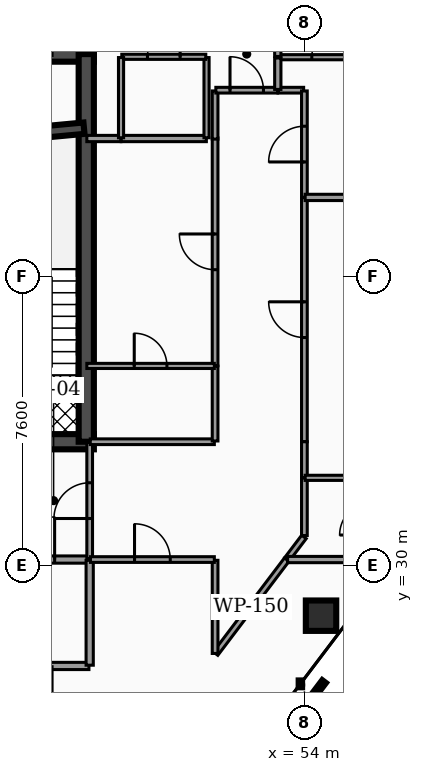
"""IFC4 building model, lengths in metres.
Left out: names, types, materials, properties, quantities, classifications, styles, units other than length and angle.
Written with IfcOpenShell. Run it as: python <this file> out.ifc"""

import sys

from ifc_helpers import new_model, si_unit, direction, frame, frame_2d, origin, origin_2d, place, context, subcontext, project, spatial, rectangle, hollow_rectangle, extrude, element, fill, save


model = new_model("IFC4")
c1 = context("Model", 3, precision=1e-05, world=origin(), true_north=direction((0.0, 1.0)))
c2 = subcontext(c1, "Body", "Model", "MODEL_VIEW")
j1 = project(units=[si_unit("LENGTHUNIT", "METRE"), si_unit("PLANEANGLEUNIT", "RADIAN")], contexts=[c1])
p1 = place(None, origin())
s1 = spatial("IfcSite", under=j1, at=p1, CompositionType="ELEMENT")
p2 = place(p1, origin())
s2 = spatial("IfcBuilding", under=s1, at=p2, CompositionType="ELEMENT")
p3 = place(p2, frame((0.0, 0.0, 130.9)))
s3 = spatial("IfcBuildingStorey", under=s2, at=p3, CompositionType="ELEMENT", Elevation=130.9)
p4 = place(p3, frame((28.4, 43.45, 0.0), z_axis=(0.0, 0.0, 1.0), x_axis=(1.0, 0.0, 0.0)))
e1 = element("IfcWall", 1, at=p4, inside=s3, PredefinedType="SHEAR", context=c2, shape_type="SweptSolid", body=[
    extrude(rectangle(XDim=20.06, YDim=0.4, at=frame_2d((10.03, 0.0))), origin(), (0.0, 0.0, 1.0), 3.5),
])
p5 = place(p3, frame((28.4, 33.25, 0.0), z_axis=(0.0, 0.0, 1.0), x_axis=(1.0, 0.0, 0.0)))
e2 = element("IfcWall", 2, at=p5, inside=s3, PredefinedType="SHEAR", context=c2, shape_type="SweptSolid", body=[
    extrude(rectangle(XDim=20.06, YDim=0.4, at=frame_2d((10.03, 0.0))), origin(), (0.0, 0.0, 1.0), 3.5),
])
p6 = place(p5, frame((4.03, 0.0, 0.0)))
e3 = element("IfcOpeningElement", 3, at=p6, cuts=e2, PredefinedType="OPENING", context=c2, shape_type="SweptSolid", body=[
    extrude(rectangle(XDim=1.1, YDim=2.15, at=frame_2d((0.55, 1.075))), frame((0.0, 0.21, 0.0), z_axis=(0.0, -1.0, 0.0), x_axis=(1.0, 0.0, 0.0)), (0.0, 0.0, 1.0), 0.42),
])
p7 = place(p5, frame((14.87, 0.0, 0.0)))
e4 = element("IfcOpeningElement", 4, at=p7, cuts=e2, PredefinedType="OPENING", context=c2, shape_type="SweptSolid", body=[
    extrude(rectangle(XDim=1.1, YDim=2.15, at=frame_2d((0.55, 1.075))), frame((0.0, 0.21, 0.0), z_axis=(0.0, -1.0, 0.0), x_axis=(1.0, 0.0, 0.0)), (0.0, 0.0, 1.0), 0.42),
])
p8 = place(p5, frame((5.95, 0.0, 0.0)))
e5 = element("IfcOpeningElement", 5, at=p8, cuts=e2, PredefinedType="OPENING", context=c2, shape_type="SweptSolid", body=[
    extrude(rectangle(XDim=1.0, YDim=2.1, at=frame_2d((0.5, 1.05))), frame((0.0, 0.21, 0.0), z_axis=(0.0, -1.0, 0.0), x_axis=(1.0, 0.0, 0.0)), (0.0, 0.0, 1.0), 0.42),
])
p9 = place(p5, frame((7.65, 0.0, 0.0)))
e6 = element("IfcOpeningElement", 6, at=p9, cuts=e2, PredefinedType="OPENING", context=c2, shape_type="SweptSolid", body=[
    extrude(rectangle(XDim=1.0, YDim=2.1, at=frame_2d((0.5, 1.05))), frame((0.0, 0.21, 0.0), z_axis=(0.0, -1.0, 0.0), x_axis=(1.0, 0.0, 0.0)), (0.0, 0.0, 1.0), 0.42),
])
p10 = place(p5, frame((1.31, 0.0, 0.0)))
e7 = element("IfcOpeningElement", 7, at=p10, cuts=e2, PredefinedType="OPENING", context=c2, shape_type="SweptSolid", body=[
    extrude(rectangle(XDim=1.1, YDim=2.2, at=frame_2d((0.55, 1.1))), frame((0.0, 0.21, 0.0), z_axis=(0.0, -1.0, 0.0), x_axis=(1.0, 0.0, 0.0)), (0.0, 0.0, 1.0), 0.42),
])
p11 = place(p5, frame((9.44, 0.0, 0.0)))
e8 = element("IfcOpeningElement", 8, at=p11, cuts=e2, PredefinedType="OPENING", context=c2, shape_type="SweptSolid", body=[
    extrude(rectangle(XDim=1.12, YDim=2.05, at=frame_2d((0.56, 1.025))), frame((0.0, 0.21, 0.0), z_axis=(0.0, -1.0, 0.0), x_axis=(1.0, 0.0, 0.0)), (0.0, 0.0, 1.0), 0.42),
])
p12 = place(p5, frame((17.65, 0.0, 0.0)))
e9 = element("IfcOpeningElement", 9, at=p12, cuts=e2, PredefinedType="OPENING", context=c2, shape_type="SweptSolid", body=[
    extrude(rectangle(XDim=1.1, YDim=2.2, at=frame_2d((0.55, 1.1))), frame((0.0, 0.21, 0.0), z_axis=(0.0, -1.0, 0.0), x_axis=(1.0, 0.0, 0.0)), (0.0, 0.0, 1.0), 0.42),
])
p13 = place(p3, frame((48.26, 33.25, 0.0), z_axis=(0.0, 0.0, 1.0), x_axis=(0.0, 1.0, 0.0)))
e10 = element("IfcWall", 10, at=p13, inside=s3, PredefinedType="SHEAR", context=c2, shape_type="SweptSolid", body=[
    extrude(rectangle(XDim=10.2, YDim=0.4, at=frame_2d((5.1, 0.0))), origin(), (0.0, 0.0, 1.0), 3.5),
])
p14 = place(p3, frame((44.98, 41.2, 0.0), z_axis=(0.0, 0.0, 1.0), x_axis=(0.995686468965, 0.09278176286, 0.0)))
e11 = element("IfcWall", 11, at=p14, inside=s3, PredefinedType="SHEAR", context=c2, shape_type="SweptSolid", body=[
    extrude(rectangle(XDim=3.234, YDim=0.3, at=frame_2d((1.617, 0.0))), origin(), (0.0, 0.0, 1.0), 3.5),
])
p15 = place(p3, frame((54.438, 28.673, 0.0), z_axis=(-0.036360710558, 0.038520063101, 0.998596066218), x_axis=(-0.727195467978, -0.686430441744, 0.0)))
e12 = element("IfcColumn", 12, at=p15, inside=s3, PredefinedType="COLUMN", context=c2, shape_type="SweptSolid", body=[
    extrude(hollow_rectangle(XDim=0.8, YDim=0.8, WallThickness=0.04, at=origin_2d()), origin(), (0.0, 0.0, 1.0), 3.505),
])
p16 = place(p3, frame((45.405, 30.15, 0.0), z_axis=(0.0, 0.0, 1.0), x_axis=(1.0, 0.0, 0.0)))
e13 = element("IfcWall", 13, at=p16, inside=s3, PredefinedType="PARTITIONING", context=c2, shape_type="SweptSolid", body=[
    extrude(rectangle(XDim=2.925, YDim=0.19, at=frame_2d((1.462, 0.0))), origin(), (0.0, 0.0, 1.0), 2.457),
])
p17 = place(p16, frame((0.903, 0.0, 0.0)))
e14 = element("IfcOpeningElement", 14, at=p17, cuts=e13, PredefinedType="OPENING", context=c2, shape_type="SweptSolid", body=[
    extrude(rectangle(XDim=1.12, YDim=2.05, at=frame_2d((0.56, 1.025))), frame((0.0, 0.105, 0.0), z_axis=(0.0, -1.0, 0.0), x_axis=(1.0, 0.0, 0.0)), (0.0, 0.0, 1.0), 0.21),
])
p18 = place(p3, frame((48.35, 30.17, 0.0), z_axis=(0.0, 0.0, 1.0), x_axis=(0.0, 1.0, 0.0)))
e15 = element("IfcWall", 15, at=p18, inside=s3, PredefinedType="PARTITIONING", context=c2, shape_type="SweptSolid", body=[
    extrude(rectangle(XDim=3.06, YDim=0.15, at=frame_2d((1.53, 0.0))), origin(), (0.0, 0.0, 1.0), 2.457),
])
p19 = place(p18, frame((1.06, 0.0, 0.0)))
e16 = element("IfcOpeningElement", 16, at=p19, cuts=e15, PredefinedType="OPENING", context=c2, shape_type="SweptSolid", body=[
    extrude(rectangle(XDim=0.94, YDim=2.05, at=frame_2d((0.47, 1.025))), frame((0.0, 0.085, 0.0), z_axis=(0.0, -1.0, 0.0), x_axis=(1.0, 0.0, 0.0)), (0.0, 0.0, 1.0), 0.17),
])
p20 = place(p3, frame((47.305, 27.35, 0.0), z_axis=(0.0, 0.0, 1.0), x_axis=(1.0, 0.0, 0.0)))
e17 = element("IfcWall", 17, at=p20, inside=s3, PredefinedType="PARTITIONING", context=c2, shape_type="SweptSolid", body=[
    extrude(rectangle(XDim=1.025, YDim=0.19, at=frame_2d((0.513, 0.0))), origin(), (0.0, 0.0, 1.0), 2.457),
])
p21 = place(p3, frame((48.35, 27.37, 0.0), z_axis=(0.0, 0.0, 1.0), x_axis=(0.0, 1.0, 0.0)))
e18 = element("IfcWall", 18, at=p21, inside=s3, PredefinedType="PARTITIONING", context=c2, shape_type="SweptSolid", body=[
    extrude(rectangle(XDim=2.76, YDim=0.19, at=frame_2d((1.38, 0.0))), origin(), (0.0, 0.0, 1.0), 2.457),
])
p22 = place(p3, frame((51.662, 27.675, 0.0), z_axis=(0.0, 0.0, 1.0), x_axis=(0.603831940294, 0.797111653334, 0.0)))
e19 = element("IfcWall", 19, at=p22, inside=s3, PredefinedType="PARTITIONING", context=c2, shape_type="SweptSolid", body=[
    extrude(rectangle(XDim=3.104, YDim=0.15, at=frame_2d((1.552, 0.0))), origin(), (0.0, 0.0, 1.0), 2.457),
])
p23 = place(p3, frame((51.65, 27.679, 0.0), z_axis=(0.0, 0.0, 1.0), x_axis=(0.0, 1.0, 0.0)))
e20 = element("IfcWall", 20, at=p23, inside=s3, PredefinedType="PARTITIONING", context=c2, shape_type="SweptSolid", body=[
    extrude(rectangle(XDim=2.451, YDim=0.15, at=frame_2d((1.225, 0.0))), origin(), (0.0, 0.0, 1.0), 2.457),
])
p24 = place(p3, frame((48.37, 30.15, 0.0), z_axis=(0.0, 0.0, 1.0), x_axis=(1.0, 0.0, 0.0)))
e21 = element("IfcWall", 21, at=p24, inside=s3, PredefinedType="PARTITIONING", context=c2, shape_type="SweptSolid", body=[
    extrude(rectangle(XDim=3.26, YDim=0.15, at=frame_2d((1.63, 0.0))), origin(), (0.0, 0.0, 1.0), 2.457),
])
p25 = place(p24, frame((1.16, 0.0, 0.0)))
e22 = element("IfcOpeningElement", 22, at=p25, cuts=e21, PredefinedType="OPENING", context=c2, shape_type="SweptSolid", body=[
    extrude(rectangle(XDim=0.94, YDim=2.05, at=frame_2d((0.47, 1.025))), frame((0.0, 0.085, 0.0), z_axis=(0.0, -1.0, 0.0), x_axis=(1.0, 0.0, 0.0)), (0.0, 0.0, 1.0), 0.17),
])
p26 = place(p3, frame((54.0, 33.25, 0.0), z_axis=(0.0, 0.0, 1.0), x_axis=(0.0, 1.0, 0.0)))
e23 = element("IfcWall", 23, at=p26, inside=s3, PredefinedType="PARTITIONING", context=c2, shape_type="SweptSolid", body=[
    extrude(rectangle(XDim=6.423, YDim=0.15, at=frame_2d((3.212, 0.0))), origin(), (0.0, 0.0, 1.0), 2.457),
])
p27 = place(p26, frame((2.742, 0.0, 0.0)))
e24 = element("IfcOpeningElement", 24, at=p27, cuts=e23, PredefinedType="OPENING", context=c2, shape_type="SweptSolid", body=[
    extrude(rectangle(XDim=0.94, YDim=2.05, at=frame_2d((0.47, 1.025))), frame((0.0, 0.085, 0.0), z_axis=(0.0, -1.0, 0.0), x_axis=(1.0, 0.0, 0.0)), (0.0, 0.0, 1.0), 0.17),
])
p28 = place(p3, frame((54.0, 32.305, 0.0), z_axis=(0.0, 0.0, 1.0), x_axis=(0.0, 1.0, 0.0)))
e25 = element("IfcWall", 25, at=p28, inside=s3, PredefinedType="PARTITIONING", context=c2, shape_type="SweptSolid", body=[
    extrude(rectangle(XDim=0.945, YDim=0.15, at=frame_2d((0.473, 0.0))), origin(), (0.0, 0.0, 1.0), 2.457),
])
p29 = place(p3, frame((54.0, 30.781, 0.0), z_axis=(0.0, 0.0, 1.0), x_axis=(0.0, 1.0, 0.0)))
e26 = element("IfcWall", 26, at=p29, inside=s3, PredefinedType="PARTITIONING", context=c2, shape_type="SweptSolid", body=[
    extrude(rectangle(XDim=1.514, YDim=0.15, at=frame_2d((0.757, 0.0))), origin(), (0.0, 0.0, 1.0), 2.457),
])
p30 = place(p3, frame((53.54, 30.154, 0.0), z_axis=(0.0, 0.0, 1.0), x_axis=(0.603680225987, 0.797226557982, 0.0)))
e27 = element("IfcWall", 27, at=p30, inside=s3, PredefinedType="PARTITIONING", context=c2, shape_type="SweptSolid", body=[
    extrude(rectangle(XDim=0.742, YDim=0.15, at=frame_2d((0.371, 0.0))), origin(), (0.0, 0.0, 1.0), 2.457),
])
p31 = place(p3, frame((53.305, 42.5, 0.0), z_axis=(0.0, 0.0, 1.0), x_axis=(1.0, 0.0, 0.0)))
e28 = element("IfcWall", 28, at=p31, inside=s3, PredefinedType="PARTITIONING", context=c2, shape_type="SweptSolid", body=[
    extrude(rectangle(XDim=0.675, YDim=0.15, at=frame_2d((0.337, 0.0))), origin(), (0.0, 0.0, 1.0), 2.457),
])
p32 = place(p3, frame((54.0, 39.683, 0.0), z_axis=(0.0, 0.0, 1.0), x_axis=(0.0, 1.0, 0.0)))
e29 = element("IfcWall", 29, at=p32, inside=s3, PredefinedType="PARTITIONING", context=c2, shape_type="SweptSolid", body=[
    extrude(rectangle(XDim=2.797, YDim=0.15, at=frame_2d((1.398, 0.0))), origin(), (0.0, 0.0, 1.0), 2.457),
])
p33 = place(p32, frame((0.928, 0.0, 0.0)))
e30 = element("IfcOpeningElement", 30, at=p33, cuts=e29, PredefinedType="OPENING", context=c2, shape_type="SweptSolid", body=[
    extrude(rectangle(XDim=0.94, YDim=2.05, at=frame_2d((0.47, 1.025))), frame((0.0, 0.085, 0.0), z_axis=(0.0, -1.0, 0.0), x_axis=(1.0, 0.0, 0.0)), (0.0, 0.0, 1.0), 0.17),
])
p34 = place(p3, frame((51.65, 35.25, 0.0), z_axis=(0.0, 0.0, 1.0), x_axis=(0.0, 1.0, 0.0)))
e31 = element("IfcWall", 31, at=p34, inside=s3, PredefinedType="PARTITIONING", context=c2, shape_type="SweptSolid", body=[
    extrude(rectangle(XDim=5.994, YDim=0.15, at=frame_2d((2.997, 0.0))), origin(), (0.0, 0.0, 1.0), 2.457),
])
p35 = place(p34, frame((2.527, 0.0, 0.0)))
e32 = element("IfcOpeningElement", 32, at=p35, cuts=e31, PredefinedType="OPENING", context=c2, shape_type="SweptSolid", body=[
    extrude(rectangle(XDim=0.94, YDim=2.05, at=frame_2d((0.47, 1.025))), frame((0.0, 0.085, 0.0), z_axis=(0.0, -1.0, 0.0), x_axis=(1.0, 0.0, 0.0)), (0.0, 0.0, 1.0), 0.17),
])
p36 = place(p3, frame((48.365, 33.25, 0.0), z_axis=(0.0, 0.0, 1.0), x_axis=(1.0, 0.0, 0.0)))
e33 = element("IfcWall", 33, at=p36, inside=s3, PredefinedType="PARTITIONING", context=c2, shape_type="SweptSolid", body=[
    extrude(rectangle(XDim=3.265, YDim=0.15, at=frame_2d((1.632, 0.0))), origin(), (0.0, 0.0, 1.0), 2.457),
])
p37 = place(p3, frame((51.65, 33.27, 0.0), z_axis=(0.0, 0.0, 1.0), x_axis=(0.0, 1.0, 0.0)))
e34 = element("IfcWall", 34, at=p37, inside=s3, PredefinedType="PARTITIONING", context=c2, shape_type="SweptSolid", body=[
    extrude(rectangle(XDim=1.969, YDim=0.15, at=frame_2d((0.985, 0.0))), origin(), (0.0, 0.0, 1.0), 2.457),
])
p38 = place(p3, frame((51.65, 41.213, 0.0), z_axis=(0.0, 0.0, 1.0), x_axis=(0.0, 1.0, 0.0)))
e35 = element("IfcWall", 35, at=p38, inside=s3, PredefinedType="PARTITIONING", context=c2, shape_type="SweptSolid", body=[
    extrude(rectangle(XDim=1.267, YDim=0.15, at=frame_2d((0.633, 0.0))), origin(), (0.0, 0.0, 1.0), 2.457),
])
p39 = place(p3, frame((51.67, 42.5, 0.0), z_axis=(0.0, 0.0, 1.0), x_axis=(1.0, 0.0, 0.0)))
e36 = element("IfcWall", 36, at=p39, inside=s3, PredefinedType="PARTITIONING", context=c2, shape_type="SweptSolid", body=[
    extrude(rectangle(XDim=1.625, YDim=0.15, at=frame_2d((0.812, 0.0))), origin(), (0.0, 0.0, 1.0), 2.457),
])
p40 = place(p39, frame((0.373, 0.0, 0.0)))
e37 = element("IfcOpeningElement", 37, at=p40, cuts=e36, PredefinedType="OPENING", context=c2, shape_type="SweptSolid", body=[
    extrude(rectangle(XDim=0.88, YDim=2.05, at=frame_2d((0.44, 1.025))), frame((0.0, 0.085, 0.0), z_axis=(0.0, -1.0, 0.0), x_axis=(1.0, 0.0, 0.0)), (0.0, 0.0, 1.0), 0.17),
])
p41 = place(p3, frame((47.3, 25.292, 0.0), z_axis=(0.0, 0.0, 1.0), x_axis=(0.0, 1.0, 0.0)))
e38 = element("IfcWall", 38, at=p41, inside=s3, PredefinedType="PARTITIONING", context=c2, shape_type="SweptSolid", body=[
    extrude(rectangle(XDim=2.038, YDim=0.12, at=frame_2d((1.019, 0.0))), origin(), (0.0, 0.0, 1.0), 2.457),
])
p42 = place(p3, frame((47.3, 43.415, 0.0), z_axis=(0.0, 0.0, 1.0), x_axis=(0.0, 1.0, 0.0)))
e39 = element("IfcWall", 39, at=p42, inside=s3, PredefinedType="PARTITIONING", context=c2, shape_type="SweptSolid", body=[
    extrude(rectangle(XDim=5.837, YDim=0.12, at=frame_2d((2.918, 0.0))), origin(), (0.0, 0.0, 1.0), 2.457),
])
p43 = place(p3, frame((53.557, 30.15, 0.0), z_axis=(0.0, 0.0, 1.0), x_axis=(1.0, 0.0, 0.0)))
e40 = element("IfcWall", 40, at=p43, inside=s3, PredefinedType="PARTITIONING", context=c2, shape_type="SweptSolid", body=[
    extrude(rectangle(XDim=2.225, YDim=0.165, at=frame_2d((1.113, 0.0))), origin(), (0.0, 0.0, 1.0), 2.457),
])
p44 = place(p3, frame((54.02, 32.3, 0.0), z_axis=(0.0, 0.0, 1.0), x_axis=(1.0, 0.0, 0.0)))
e41 = element("IfcWall", 41, at=p44, inside=s3, PredefinedType="PARTITIONING", context=c2, shape_type="SweptSolid", body=[
    extrude(rectangle(XDim=1.747, YDim=0.135, at=frame_2d((0.874, 0.0))), origin(), (0.0, 0.0, 1.0), 2.457),
])
p45 = place(p3, frame((54.02, 39.678, 0.0), z_axis=(0.0, 0.0, 1.0), x_axis=(1.0, 0.0, 0.0)))
e42 = element("IfcWall", 42, at=p45, inside=s3, PredefinedType="PARTITIONING", context=c2, shape_type="SweptSolid", body=[
    extrude(rectangle(XDim=7.967, YDim=0.165, at=frame_2d((3.983, 0.0))), origin(), (0.0, 0.0, 1.0), 2.457),
])
p46 = place(p3, frame((53.32, 43.367, 0.0), z_axis=(0.0, 0.0, 1.0), x_axis=(1.0, 0.0, 0.0)))
e43 = element("IfcWall", 43, at=p46, inside=s3, PredefinedType="PARTITIONING", context=c2, shape_type="SweptSolid", body=[
    extrude(rectangle(XDim=2.21, YDim=0.135, at=frame_2d((1.105, 0.0))), origin(), (0.0, 0.0, 1.0), 2.457),
])
p47 = place(p46, frame((0.875, 0.0, 0.0)))
e44 = element("IfcOpeningElement", 44, at=p47, cuts=e43, PredefinedType="OPENING", context=c2, shape_type="SweptSolid", body=[
    extrude(rectangle(XDim=0.86, YDim=2.05, at=frame_2d((0.43, 1.025))), frame((0.0, 0.077, 0.0), z_axis=(0.0, -1.0, 0.0), x_axis=(1.0, 0.0, 0.0)), (0.0, 0.0, 1.0), 0.155),
])
p48 = place(p3, frame((53.3, 42.52, 0.0), z_axis=(0.0, 0.0, 1.0), x_axis=(0.0, 1.0, 0.0)))
e45 = element("IfcWall", 45, at=p48, inside=s3, PredefinedType="PARTITIONING", context=c2, shape_type="SweptSolid", body=[
    extrude(rectangle(XDim=0.827, YDim=0.165, at=frame_2d((0.414, 0.0))), origin(), (0.0, 0.0, 1.0), 2.457),
])
p49 = place(p3, frame((53.3, 43.387, 0.0), z_axis=(0.0, 0.0, 1.0), x_axis=(0.0, 1.0, 0.0)))
e46 = element("IfcWall", 46, at=p49, inside=s3, PredefinedType="PARTITIONING", context=c2, shape_type="SweptSolid", body=[
    extrude(rectangle(XDim=2.11, YDim=0.165, at=frame_2d((1.055, 0.0))), origin(), (0.0, 0.0, 1.0), 2.457),
])
p50 = place(p3, frame((48.275, 35.245, 0.0), z_axis=(0.0, 0.0, 1.0), x_axis=(1.0, 0.0, 0.0)))
e47 = element("IfcWall", 47, at=p50, inside=s3, PredefinedType="PARTITIONING", context=c2, shape_type="SweptSolid", body=[
    extrude(rectangle(XDim=3.355, YDim=0.135, at=frame_2d((1.677, 0.0))), origin(), (0.0, 0.0, 1.0), 2.457),
])
p51 = place(p50, frame((1.248, 0.0, 0.0)))
e48 = element("IfcOpeningElement", 48, at=p51, cuts=e47, PredefinedType="OPENING", context=c2, shape_type="SweptSolid", body=[
    extrude(rectangle(XDim=0.86, YDim=2.05, at=frame_2d((0.43, 1.025))), frame((0.0, 0.077, 0.0), z_axis=(0.0, -1.0, 0.0), x_axis=(1.0, 0.0, 0.0)), (0.0, 0.0, 1.0), 0.155),
])
p52 = place(p3, frame((48.275, 41.228, 0.0), z_axis=(0.0, 0.0, 1.0), x_axis=(1.0, 0.0, 0.0)))
e49 = element("IfcWall", 49, at=p52, inside=s3, PredefinedType="PARTITIONING", context=c2, shape_type="SweptSolid", body=[
    extrude(rectangle(XDim=0.895, YDim=0.165, at=frame_2d((0.448, 0.0))), origin(), (0.0, 0.0, 1.0), 2.457),
])
p53 = place(p3, frame((49.18, 41.228, 0.0), z_axis=(0.0, 0.0, 1.0), x_axis=(1.0, 0.0, 0.0)))
e50 = element("IfcWall", 50, at=p53, inside=s3, PredefinedType="PARTITIONING", context=c2, shape_type="SweptSolid", body=[
    extrude(rectangle(XDim=2.24, YDim=0.165, at=frame_2d((1.12, 0.0))), origin(), (0.0, 0.0, 1.0), 2.457),
])
p54 = place(p3, frame((51.425, 41.248, 0.0), z_axis=(0.0, 0.0, 1.0), x_axis=(0.0, 1.0, 0.0)))
e51 = element("IfcWall", 51, at=p54, inside=s3, PredefinedType="PARTITIONING", context=c2, shape_type="SweptSolid", body=[
    extrude(rectangle(XDim=2.11, YDim=0.135, at=frame_2d((1.055, 0.0))), origin(), (0.0, 0.0, 1.0), 2.457),
])
p55 = place(p3, frame((49.195, 43.378, 0.0), z_axis=(0.0, 0.0, 1.0), x_axis=(1.0, 0.0, 0.0)))
e52 = element("IfcWall", 52, at=p55, inside=s3, PredefinedType="PARTITIONING", context=c2, shape_type="SweptSolid", body=[
    extrude(rectangle(XDim=2.21, YDim=0.135, at=frame_2d((1.105, 0.0))), origin(), (0.0, 0.0, 1.0), 2.457),
])
p56 = place(p55, frame((0.675, 0.0, 0.0)))
e53 = element("IfcOpeningElement", 53, at=p56, cuts=e52, PredefinedType="OPENING", context=c2, shape_type="SweptSolid", body=[
    extrude(rectangle(XDim=0.86, YDim=2.05, at=frame_2d((0.43, 1.025))), frame((0.0, 0.077, 0.0), z_axis=(0.0, -1.0, 0.0), x_axis=(1.0, 0.0, 0.0)), (0.0, 0.0, 1.0), 0.155),
])
p57 = place(p3, frame((49.175, 41.248, 0.0), z_axis=(0.0, 0.0, 1.0), x_axis=(0.0, 1.0, 0.0)))
e54 = element("IfcWall", 54, at=p57, inside=s3, PredefinedType="PARTITIONING", context=c2, shape_type="SweptSolid", body=[
    extrude(rectangle(XDim=2.11, YDim=0.135, at=frame_2d((1.055, 0.0))), origin(), (0.0, 0.0, 1.0), 2.457),
])
p58 = place(p17, origin())
e55 = element("IfcDoor", 55, at=p58, inside=s3, OperationType="SINGLE_SWING_RIGHT", PredefinedType="DOOR", context=c2, shape_type="SweptSolid", body=[
    extrude(rectangle(XDim=1.12, YDim=2.05, at=frame_2d((0.56, 1.025))), frame((0.0, 0.025, 0.0), z_axis=(0.0, -1.0, 0.0), x_axis=(1.0, 0.0, 0.0)), (0.0, 0.0, 1.0), 0.05),
])
fill(e14, e55)
p59 = place(p19, origin())
e56 = element("IfcDoor", 56, at=p59, inside=s3, OperationType="SINGLE_SWING_LEFT", PredefinedType="DOOR", context=c2, shape_type="SweptSolid", body=[
    extrude(rectangle(XDim=0.94, YDim=2.05, at=frame_2d((0.47, 1.025))), frame((0.0, 0.025, 0.0), z_axis=(0.0, -1.0, 0.0), x_axis=(1.0, 0.0, 0.0)), (0.0, 0.0, 1.0), 0.05),
])
fill(e16, e56)
p60 = place(p25, origin())
e57 = element("IfcDoor", 57, at=p60, inside=s3, OperationType="SINGLE_SWING_LEFT", PredefinedType="DOOR", context=c2, shape_type="SweptSolid", body=[
    extrude(rectangle(XDim=0.94, YDim=2.05, at=frame_2d((0.47, 1.025))), frame((0.0, 0.025, 0.0), z_axis=(0.0, -1.0, 0.0), x_axis=(1.0, 0.0, 0.0)), (0.0, 0.0, 1.0), 0.05),
])
fill(e22, e57)
p61 = place(p27, origin())
e58 = element("IfcDoor", 58, at=p61, inside=s3, OperationType="SINGLE_SWING_RIGHT", PredefinedType="DOOR", context=c2, shape_type="SweptSolid", body=[
    extrude(rectangle(XDim=0.94, YDim=2.05, at=frame_2d((0.47, 1.025))), frame((0.0, 0.025, 0.0), z_axis=(0.0, -1.0, 0.0), x_axis=(1.0, 0.0, 0.0)), (0.0, 0.0, 1.0), 0.05),
])
fill(e24, e58)
p62 = place(p33, origin())
e59 = element("IfcDoor", 59, at=p62, inside=s3, OperationType="SINGLE_SWING_LEFT", PredefinedType="DOOR", context=c2, shape_type="SweptSolid", body=[
    extrude(rectangle(XDim=0.94, YDim=2.05, at=frame_2d((0.47, 1.025))), frame((0.0, 0.025, 0.0), z_axis=(0.0, -1.0, 0.0), x_axis=(1.0, 0.0, 0.0)), (0.0, 0.0, 1.0), 0.05),
])
fill(e30, e59)
p63 = place(p35, origin())
e60 = element("IfcDoor", 60, at=p63, inside=s3, OperationType="SINGLE_SWING_RIGHT", PredefinedType="DOOR", context=c2, shape_type="SweptSolid", body=[
    extrude(rectangle(XDim=0.94, YDim=2.05, at=frame_2d((0.47, 1.025))), frame((0.0, 0.025, 0.0), z_axis=(0.0, -1.0, 0.0), x_axis=(1.0, 0.0, 0.0)), (0.0, 0.0, 1.0), 0.05),
])
fill(e32, e60)
p64 = place(p40, origin())
e61 = element("IfcDoor", 61, at=p64, inside=s3, OperationType="SINGLE_SWING_LEFT", PredefinedType="DOOR", context=c2, shape_type="SweptSolid", body=[
    extrude(rectangle(XDim=0.88, YDim=2.05, at=frame_2d((0.44, 1.025))), frame((0.0, 0.025, 0.0), z_axis=(0.0, -1.0, 0.0), x_axis=(1.0, 0.0, 0.0)), (0.0, 0.0, 1.0), 0.05),
])
fill(e37, e61)
p65 = place(p47, origin())
e62 = element("IfcDoor", 62, at=p65, inside=s3, OperationType="SINGLE_SWING_RIGHT", PredefinedType="DOOR", context=c2, shape_type="SweptSolid", body=[
    extrude(rectangle(XDim=0.86, YDim=2.05, at=frame_2d((0.43, 1.025))), frame((0.0, 0.025, 0.0), z_axis=(0.0, -1.0, 0.0), x_axis=(1.0, 0.0, 0.0)), (0.0, 0.0, 1.0), 0.05),
])
fill(e44, e62)
p66 = place(p51, origin())
e63 = element("IfcDoor", 63, at=p66, inside=s3, OperationType="SINGLE_SWING_LEFT", PredefinedType="DOOR", context=c2, shape_type="SweptSolid", body=[
    extrude(rectangle(XDim=0.86, YDim=2.05, at=frame_2d((0.43, 1.025))), frame((0.0, 0.025, 0.0), z_axis=(0.0, -1.0, 0.0), x_axis=(1.0, 0.0, 0.0)), (0.0, 0.0, 1.0), 0.05),
])
fill(e48, e63)
p67 = place(p56, origin())
e64 = element("IfcDoor", 64, at=p67, inside=s3, OperationType="SINGLE_SWING_RIGHT", PredefinedType="DOOR", context=c2, shape_type="SweptSolid", body=[
    extrude(rectangle(XDim=0.86, YDim=2.05, at=frame_2d((0.43, 1.025))), frame((0.0, 0.025, 0.0), z_axis=(0.0, -1.0, 0.0), x_axis=(1.0, 0.0, 0.0)), (0.0, 0.0, 1.0), 0.05),
])
fill(e53, e64)
save(model, sys.argv[1])
